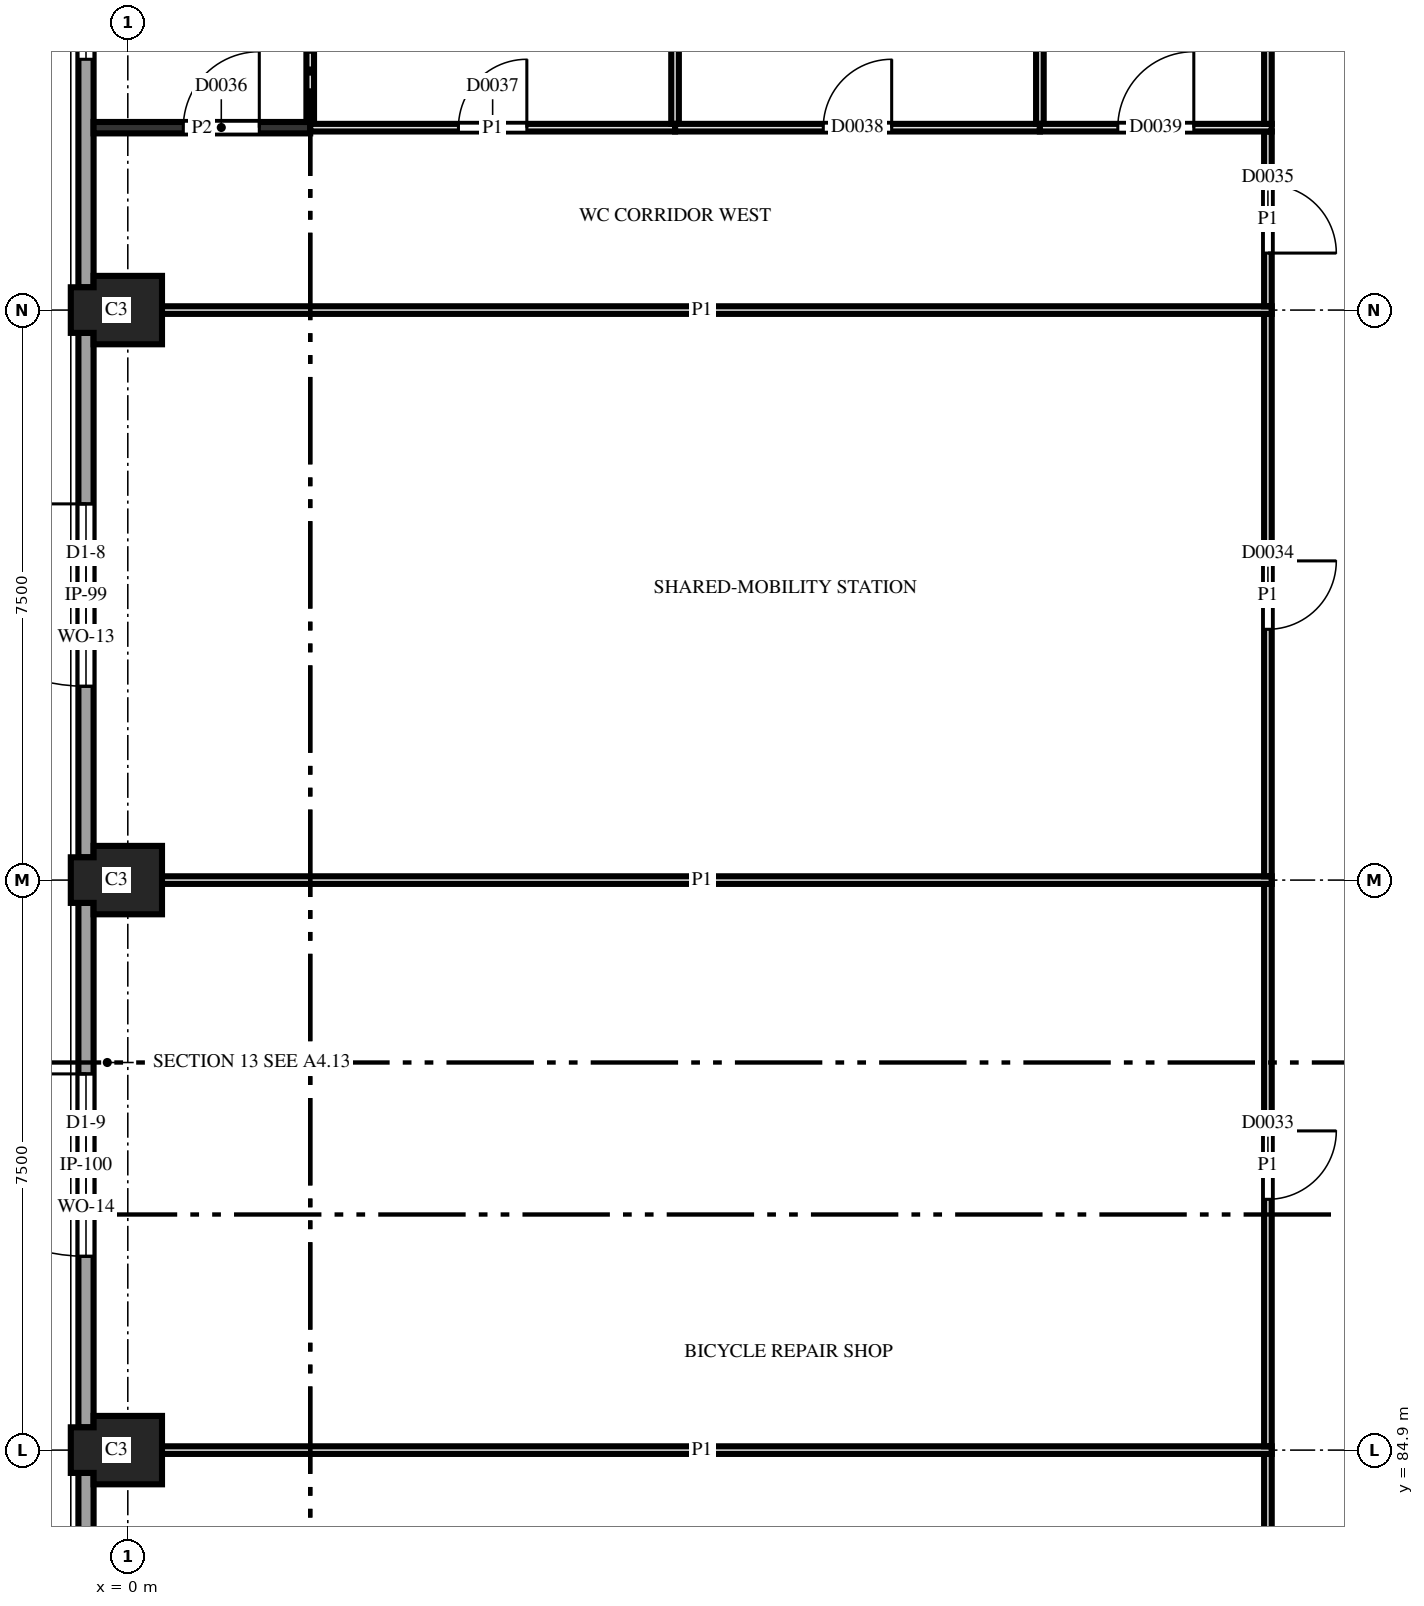
"""IFC4 building model, lengths in metres.
Left out: names, types, materials, properties, quantities, classifications, styles, units other than length and angle.
Written with IfcOpenShell. Run it as: python <this file> out.ifc"""

import sys

from ifc_helpers import new_model, si_unit, direction, frame, frame_2d, origin, place, context, subcontext, project, spatial, polyline, rectangle, outline, extrude, element, fill, save


model = new_model("IFC4")
c1 = context("Model", 3, precision=1e-05, world=origin(), true_north=direction((0.0, 1.0)))
c2 = subcontext(c1, "Body", "Model", "MODEL_VIEW")
j1 = project(units=[si_unit("LENGTHUNIT", "METRE"), si_unit("PLANEANGLEUNIT", "RADIAN")], contexts=[c1])
p1 = place(None, origin())
s1 = spatial("IfcSite", under=j1, at=p1, CompositionType="ELEMENT")
p2 = place(p1, origin())
s2 = spatial("IfcBuilding", under=s1, at=p2, CompositionType="ELEMENT")
p3 = place(p2, origin())
s3 = spatial("IfcBuildingStorey", under=s2, at=p3, CompositionType="ELEMENT", Elevation=0.0)
for number, where, z_axis, x_axis in (
    (1, (0.0, 84.9, 0.0), (0.0, 0.0, 1.0), (-1.0, 0.0, 0.0)),
    (2, (0.0, 92.4, 0.0), (0.0, 0.0, 1.0), (-1.0, 0.0, 0.0)),
    (3, (0.0, 99.9, 0.0), (0.0, 0.0, 1.0), (-1.0, 0.0, 0.0)),
):
    element("IfcColumn", number, at=place(p3, frame(where, z_axis=z_axis, x_axis=x_axis)), inside=s3, PredefinedType="COLUMN", context=c2, shape_type="SweptSolid", body=[
        extrude(outline(polyline([(-0.45, -0.45), (0.45, -0.45), (0.45, -0.3), (0.75, -0.3), (0.75, 0.3), (0.45, 0.3), (0.45, 0.45), (-0.45, 0.45), (-0.45, -0.45)])), origin(), (0.0, 0.0, 1.0), 4.5),
    ])
p4 = place(p3, frame((-0.55, 107.1, 0.0), z_axis=(0.0, 0.0, 1.0), x_axis=(0.0, -1.0, 0.0)))
e4 = element("IfcWall", 4, at=p4, inside=s3, PredefinedType="SOLIDWALL", context=c2, shape_type="SweptSolid", body=[
    extrude(outline(polyline([(0.0, 0.0), (6.9, 0.0), (6.9, 3.1), (6.002, 3.1), (6.0, 2.4), (5.681, 2.56), (5.363, 2.695), (5.044, 2.806), (4.725, 2.895), (4.406, 2.963), (4.087, 3.012), (3.769, 3.041), (3.45, 3.05), (3.131, 3.041), (2.812, 3.012), (2.494, 2.963), (2.175, 2.895), (1.856, 2.806), (1.538, 2.695), (1.219, 2.56), (0.9, 2.4), (0.898, 3.1), (0.0, 3.1), (0.0, 0.0)])), frame((0.0, 0.1, 0.0), z_axis=(0.0, -1.0, 0.0), x_axis=(1.0, 0.0, 0.0)), (0.0, 0.0, 1.0), 0.2),
])
p5 = place(p4, frame((3.0, 0.0, 2.4)))
e5 = element("IfcOpeningElement", 5, at=p5, cuts=e4, PredefinedType="OPENING", context=c2, shape_type="SweptSolid", body=[
    extrude(rectangle(XDim=0.9, YDim=0.531, at=frame_2d((0.45, 0.266))), frame((0.0, 0.11, 0.0), z_axis=(0.0, -1.0, 0.0), x_axis=(1.0, 0.0, 0.0)), (0.0, 0.0, 1.0), 0.22),
])
p6 = place(p3, frame((-0.55, 99.6, 0.0), z_axis=(0.0, 0.0, 1.0), x_axis=(0.0, -1.0, 0.0)))
e6 = element("IfcWall", 6, at=p6, inside=s3, PredefinedType="SOLIDWALL", context=c2, shape_type="SweptSolid", body=[
    extrude(outline(polyline([(0.0, 0.0), (6.9, 0.0), (6.9, 3.1), (6.002, 3.1), (6.0, 2.4), (5.681, 2.56), (5.363, 2.695), (5.044, 2.806), (4.725, 2.895), (4.406, 2.963), (4.087, 3.012), (3.769, 3.041), (3.45, 3.05), (3.131, 3.041), (2.812, 3.012), (2.494, 2.963), (2.175, 2.895), (1.856, 2.806), (1.538, 2.695), (1.219, 2.56), (0.9, 2.4), (0.898, 3.1), (0.0, 3.1), (0.0, 0.0)])), frame((0.0, 0.1, 0.0), z_axis=(0.0, -1.0, 0.0), x_axis=(1.0, 0.0, 0.0)), (0.0, 0.0, 1.0), 0.2),
])
p7 = place(p6, frame((2.25, 0.0, 0.0)))
e7 = element("IfcOpeningElement", 7, at=p7, cuts=e6, PredefinedType="OPENING", context=c2, shape_type="SweptSolid", body=[
    extrude(rectangle(XDim=2.4, YDim=2.1, at=frame_2d((1.2, 1.05))), frame((0.0, 0.11, 0.0), z_axis=(0.0, -1.0, 0.0), x_axis=(1.0, 0.0, 0.0)), (0.0, 0.0, 1.0), 0.22),
])
p8 = place(p6, frame((2.25, 0.0, 2.25)))
e8 = element("IfcOpeningElement", 8, at=p8, cuts=e6, PredefinedType="OPENING", context=c2, shape_type="SweptSolid", body=[
    extrude(rectangle(XDim=2.4, YDim=0.563, at=frame_2d((1.2, 0.281))), frame((0.0, 0.11, 0.0), z_axis=(0.0, -1.0, 0.0), x_axis=(1.0, 0.0, 0.0)), (0.0, 0.0, 1.0), 0.22),
])
p9 = place(p3, frame((-0.55, 92.1, 0.0), z_axis=(0.0, 0.0, 1.0), x_axis=(0.0, -1.0, 0.0)))
e9 = element("IfcWall", 9, at=p9, inside=s3, PredefinedType="SOLIDWALL", context=c2, shape_type="SweptSolid", body=[
    extrude(outline(polyline([(0.0, 0.0), (6.9, 0.0), (6.9, 3.1), (6.002, 3.1), (6.0, 2.4), (5.681, 2.56), (5.363, 2.695), (5.044, 2.806), (4.725, 2.895), (4.406, 2.963), (4.087, 3.012), (3.769, 3.041), (3.45, 3.05), (3.131, 3.041), (2.812, 3.012), (2.494, 2.963), (2.175, 2.895), (1.856, 2.806), (1.538, 2.695), (1.219, 2.56), (0.9, 2.4), (0.898, 3.1), (0.0, 3.1), (0.0, 0.0)])), frame((0.0, 0.1, 0.0), z_axis=(0.0, -1.0, 0.0), x_axis=(1.0, 0.0, 0.0)), (0.0, 0.0, 1.0), 0.2),
])
p10 = place(p9, frame((2.25, 0.0, 0.0)))
e10 = element("IfcOpeningElement", 10, at=p10, cuts=e9, PredefinedType="OPENING", context=c2, shape_type="SweptSolid", body=[
    extrude(rectangle(XDim=2.4, YDim=2.1, at=frame_2d((1.2, 1.05))), frame((0.0, 0.11, 0.0), z_axis=(0.0, -1.0, 0.0), x_axis=(1.0, 0.0, 0.0)), (0.0, 0.0, 1.0), 0.22),
])
p11 = place(p9, frame((2.25, 0.0, 2.25)))
e11 = element("IfcOpeningElement", 11, at=p11, cuts=e9, PredefinedType="OPENING", context=c2, shape_type="SweptSolid", body=[
    extrude(rectangle(XDim=2.4, YDim=0.563, at=frame_2d((1.2, 0.281))), frame((0.0, 0.11, 0.0), z_axis=(0.0, -1.0, 0.0), x_axis=(1.0, 0.0, 0.0)), (0.0, 0.0, 1.0), 0.22),
])
p12 = place(p3, frame((-0.55, 84.6, 0.0), z_axis=(0.0, 0.0, 1.0), x_axis=(0.0, -1.0, 0.0)))
e12 = element("IfcWall", 12, at=p12, inside=s3, PredefinedType="SOLIDWALL", context=c2, shape_type="SweptSolid", body=[
    extrude(outline(polyline([(0.0, 0.0), (6.9, 0.0), (6.9, 3.1), (6.002, 3.1), (6.0, 2.4), (5.681, 2.56), (5.363, 2.695), (5.044, 2.806), (4.725, 2.895), (4.406, 2.963), (4.087, 3.012), (3.769, 3.041), (3.45, 3.05), (3.131, 3.041), (2.812, 3.012), (2.494, 2.963), (2.175, 2.895), (1.856, 2.806), (1.538, 2.695), (1.219, 2.56), (0.9, 2.4), (0.898, 3.1), (0.0, 3.1), (0.0, 0.0)])), frame((0.0, 0.1, 0.0), z_axis=(0.0, -1.0, 0.0), x_axis=(1.0, 0.0, 0.0)), (0.0, 0.0, 1.0), 0.2),
])
p13 = place(p12, frame((3.0, 0.0, 2.4)))
e13 = element("IfcOpeningElement", 13, at=p13, cuts=e12, PredefinedType="OPENING", context=c2, shape_type="SweptSolid", body=[
    extrude(rectangle(XDim=0.9, YDim=0.531, at=frame_2d((0.45, 0.266))), frame((0.0, 0.11, 0.0), z_axis=(0.0, -1.0, 0.0), x_axis=(1.0, 0.0, 0.0)), (0.0, 0.0, 1.0), 0.22),
])
p14 = place(p3, frame((15.0, 62.5, 0.0), z_axis=(0.0, 0.0, 1.0), x_axis=(0.0, 1.0, 0.0)))
e14 = element("IfcWall", 14, at=p14, inside=s3, PredefinedType="PARTITIONING", context=c2, shape_type="SweptSolid", body=[
    extrude(rectangle(XDim=22.35, YDim=0.1, at=frame_2d((11.175, 0.0))), origin(), (0.0, 0.0, 1.0), 3.68),
])
p15 = place(p14, frame((10.725, 0.0, 0.0)))
e15 = element("IfcOpeningElement", 15, at=p15, cuts=e14, PredefinedType="OPENING", context=c2, shape_type="SweptSolid", body=[
    extrude(rectangle(XDim=0.9, YDim=2.1, at=frame_2d((0.45, 1.05))), frame((0.0, 0.06, 0.0), z_axis=(0.0, -1.0, 0.0), x_axis=(1.0, 0.0, 0.0)), (0.0, 0.0, 1.0), 0.12),
])
p16 = place(p3, frame((15.05, 84.9, 0.0), z_axis=(0.0, 0.0, 1.0), x_axis=(-1.0, 0.0, 0.0)))
e16 = element("IfcWall", 16, at=p16, inside=s3, PredefinedType="PARTITIONING", context=c2, shape_type="SweptSolid", body=[
    extrude(rectangle(XDim=14.99, YDim=0.1, at=frame_2d((7.495, 0.0))), origin(), (0.0, 0.0, 1.0), 3.68),
])
p17 = place(p3, frame((15.0, 84.95, 0.0), z_axis=(0.0, 0.0, 1.0), x_axis=(0.0, 1.0, 0.0)))
e17 = element("IfcWall", 17, at=p17, inside=s3, PredefinedType="PARTITIONING", context=c2, shape_type="SweptSolid", body=[
    extrude(rectangle(XDim=7.4, YDim=0.1, at=frame_2d((3.7, 0.0))), origin(), (0.0, 0.0, 1.0), 3.68),
])
p18 = place(p17, frame((3.25, 0.0, 0.0)))
e18 = element("IfcOpeningElement", 18, at=p18, cuts=e17, PredefinedType="OPENING", context=c2, shape_type="SweptSolid", body=[
    extrude(rectangle(XDim=0.9, YDim=2.1, at=frame_2d((0.45, 1.05))), frame((0.0, 0.06, 0.0), z_axis=(0.0, -1.0, 0.0), x_axis=(1.0, 0.0, 0.0)), (0.0, 0.0, 1.0), 0.12),
])
p19 = place(p3, frame((15.05, 92.4, 0.0), z_axis=(0.0, 0.0, 1.0), x_axis=(-1.0, 0.0, 0.0)))
e19 = element("IfcWall", 19, at=p19, inside=s3, PredefinedType="PARTITIONING", context=c2, shape_type="SweptSolid", body=[
    extrude(rectangle(XDim=14.99, YDim=0.1, at=frame_2d((7.495, 0.0))), origin(), (0.0, 0.0, 1.0), 3.68),
])
p20 = place(p3, frame((15.0, 92.45, 0.0), z_axis=(0.0, 0.0, 1.0), x_axis=(0.0, 1.0, 0.0)))
e20 = element("IfcWall", 20, at=p20, inside=s3, PredefinedType="PARTITIONING", context=c2, shape_type="SweptSolid", body=[
    extrude(rectangle(XDim=7.4, YDim=0.1, at=frame_2d((3.7, 0.0))), origin(), (0.0, 0.0, 1.0), 3.68),
])
p21 = place(p20, frame((3.25, 0.0, 0.0)))
e21 = element("IfcOpeningElement", 21, at=p21, cuts=e20, PredefinedType="OPENING", context=c2, shape_type="SweptSolid", body=[
    extrude(rectangle(XDim=0.9, YDim=2.1, at=frame_2d((0.45, 1.05))), frame((0.0, 0.06, 0.0), z_axis=(0.0, -1.0, 0.0), x_axis=(1.0, 0.0, 0.0)), (0.0, 0.0, 1.0), 0.12),
])
p22 = place(p3, frame((15.05, 99.9, 0.0), z_axis=(0.0, 0.0, 1.0), x_axis=(-1.0, 0.0, 0.0)))
e22 = element("IfcWall", 22, at=p22, inside=s3, PredefinedType="PARTITIONING", context=c2, shape_type="SweptSolid", body=[
    extrude(rectangle(XDim=14.99, YDim=0.1, at=frame_2d((7.495, 0.0))), origin(), (0.0, 0.0, 1.0), 3.68),
])
p23 = place(p3, frame((15.0, 99.95, 0.0), z_axis=(0.0, 0.0, 1.0), x_axis=(0.0, 1.0, 0.0)))
e23 = element("IfcWall", 23, at=p23, inside=s3, PredefinedType="PARTITIONING", context=c2, shape_type="SweptSolid", body=[
    extrude(rectangle(XDim=2.3, YDim=0.1, at=frame_2d((1.15, 0.0))), origin(), (0.0, 0.0, 1.0), 3.68),
])
p24 = place(p23, frame((0.7, 0.0, 0.0)))
e24 = element("IfcOpeningElement", 24, at=p24, cuts=e23, PredefinedType="OPENING", context=c2, shape_type="SweptSolid", body=[
    extrude(rectangle(XDim=0.9, YDim=2.1, at=frame_2d((0.45, 1.05))), frame((0.0, 0.06, 0.0), z_axis=(0.0, -1.0, 0.0), x_axis=(1.0, 0.0, 0.0)), (0.0, 0.0, 1.0), 0.12),
])
p25 = place(p3, frame((2.4, 102.3, 0.0), z_axis=(0.0, 0.0, 1.0), x_axis=(-1.0, 0.0, 0.0)))
e25 = element("IfcWall", 25, at=p25, inside=s3, PredefinedType="PARTITIONING", context=c2, shape_type="SweptSolid", body=[
    extrude(rectangle(XDim=2.85, YDim=0.15, at=frame_2d((1.425, 0.0))), origin(), (0.0, 0.0, 1.0), 3.68),
])
p26 = place(p25, frame((0.67, 0.0, 0.0)))
e26 = element("IfcOpeningElement", 26, at=p26, cuts=e25, PredefinedType="OPENING", context=c2, shape_type="SweptSolid", body=[
    extrude(rectangle(XDim=1.0, YDim=2.1, at=frame_2d((0.5, 1.05))), frame((0.0, 0.085, 0.0), z_axis=(0.0, -1.0, 0.0), x_axis=(1.0, 0.0, 0.0)), (0.0, 0.0, 1.0), 0.17),
])
p27 = place(p3, frame((2.4, 102.375, 0.0), z_axis=(0.0, 0.0, 1.0), x_axis=(0.0, 1.0, 0.0)))
e27 = element("IfcWall", 27, at=p27, inside=s3, PredefinedType="PARTITIONING", context=c2, shape_type="SweptSolid", body=[
    extrude(rectangle(XDim=4.975, YDim=0.1, at=frame_2d((2.488, 0.0))), origin(), (0.0, 0.0, 1.0), 3.68),
])
p28 = place(p3, frame((7.2, 102.3, 0.0), z_axis=(0.0, 0.0, 1.0), x_axis=(-1.0, 0.0, 0.0)))
e28 = element("IfcWall", 28, at=p28, inside=s3, PredefinedType="PARTITIONING", context=c2, shape_type="SweptSolid", body=[
    extrude(rectangle(XDim=4.8, YDim=0.1, at=frame_2d((2.4, 0.0))), origin(), (0.0, 0.0, 1.0), 3.68),
])
p29 = place(p28, frame((1.95, 0.0, 0.0)))
e29 = element("IfcOpeningElement", 29, at=p29, cuts=e28, PredefinedType="OPENING", context=c2, shape_type="SweptSolid", body=[
    extrude(rectangle(XDim=0.9, YDim=2.1, at=frame_2d((0.45, 1.05))), frame((0.0, 0.06, 0.0), z_axis=(0.0, -1.0, 0.0), x_axis=(1.0, 0.0, 0.0)), (0.0, 0.0, 1.0), 0.12),
])
p30 = place(p3, frame((7.2, 102.35, 0.0), z_axis=(0.0, 0.0, 1.0), x_axis=(0.0, 1.0, 0.0)))
e30 = element("IfcWall", 30, at=p30, inside=s3, PredefinedType="PARTITIONING", context=c2, shape_type="SweptSolid", body=[
    extrude(rectangle(XDim=4.95, YDim=0.1, at=frame_2d((2.475, 0.0))), origin(), (0.0, 0.0, 1.0), 3.68),
])
p31 = place(p3, frame((12.0, 102.3, 0.0), z_axis=(0.0, 0.0, 1.0), x_axis=(-1.0, 0.0, 0.0)))
e31 = element("IfcWall", 31, at=p31, inside=s3, PredefinedType="PARTITIONING", context=c2, shape_type="SweptSolid", body=[
    extrude(rectangle(XDim=4.8, YDim=0.1, at=frame_2d((2.4, 0.0))), origin(), (0.0, 0.0, 1.0), 3.68),
])
p32 = place(p31, frame((1.95, 0.0, 0.0)))
e32 = element("IfcOpeningElement", 32, at=p32, cuts=e31, PredefinedType="OPENING", context=c2, shape_type="SweptSolid", body=[
    extrude(rectangle(XDim=0.9, YDim=2.1, at=frame_2d((0.45, 1.05))), frame((0.0, 0.06, 0.0), z_axis=(0.0, -1.0, 0.0), x_axis=(1.0, 0.0, 0.0)), (0.0, 0.0, 1.0), 0.12),
])
p33 = place(p3, frame((12.0, 102.35, 0.0), z_axis=(0.0, 0.0, 1.0), x_axis=(0.0, 1.0, 0.0)))
e33 = element("IfcWall", 33, at=p33, inside=s3, PredefinedType="PARTITIONING", context=c2, shape_type="SweptSolid", body=[
    extrude(rectangle(XDim=5.0, YDim=0.1, at=frame_2d((2.5, 0.0))), origin(), (0.0, 0.0, 1.0), 3.68),
])
p34 = place(p3, frame((15.05, 102.3, 0.0), z_axis=(0.0, 0.0, 1.0), x_axis=(-1.0, 0.0, 0.0)))
e34 = element("IfcWall", 34, at=p34, inside=s3, PredefinedType="PARTITIONING", context=c2, shape_type="SweptSolid", body=[
    extrude(rectangle(XDim=3.05, YDim=0.1, at=frame_2d((1.525, 0.0))), origin(), (0.0, 0.0, 1.0), 3.68),
])
p35 = place(p34, frame((1.025, 0.0, 0.0)))
e35 = element("IfcOpeningElement", 35, at=p35, cuts=e34, PredefinedType="OPENING", context=c2, shape_type="SweptSolid", body=[
    extrude(rectangle(XDim=1.0, YDim=2.1, at=frame_2d((0.5, 1.05))), frame((0.0, 0.06, 0.0), z_axis=(0.0, -1.0, 0.0), x_axis=(1.0, 0.0, 0.0)), (0.0, 0.0, 1.0), 0.12),
])
p36 = place(p3, frame((15.0, 102.35, 0.0), z_axis=(0.0, 0.0, 1.0), x_axis=(0.0, 1.0, 0.0)))
e36 = element("IfcWall", 36, at=p36, inside=s3, PredefinedType="PARTITIONING", context=c2, shape_type="SweptSolid", body=[
    extrude(rectangle(XDim=5.0, YDim=0.1, at=frame_2d((2.5, 0.0))), origin(), (0.0, 0.0, 1.0), 3.68),
])
p37 = place(p5, origin())
e37 = element("IfcWindow", 37, at=p37, inside=s3, PartitioningType="SINGLE_PANEL", PredefinedType="WINDOW", context=c2, shape_type="SweptSolid", body=[
    extrude(rectangle(XDim=0.9, YDim=0.531, at=frame_2d((0.45, 0.266))), frame((0.0, 0.03, 0.0), z_axis=(0.0, -1.0, 0.0), x_axis=(1.0, 0.0, 0.0)), (0.0, 0.0, 1.0), 0.06),
])
fill(e5, e37)
p38 = place(p7, frame((2.4, 0.0, 0.0), z_axis=(0.0, 0.0, 1.0), x_axis=(-1.0, 0.0, 0.0)))
e38 = element("IfcDoor", 38, at=p38, inside=s3, OperationType="SINGLE_SWING_LEFT", PredefinedType="DOOR", context=c2, shape_type="SweptSolid", body=[
    extrude(rectangle(XDim=2.4, YDim=2.1, at=frame_2d((1.2, 1.05))), frame((0.0, 0.025, 0.0), z_axis=(0.0, -1.0, 0.0), x_axis=(1.0, 0.0, 0.0)), (0.0, 0.0, 1.0), 0.05),
])
fill(e7, e38)
p39 = place(p8, origin())
e39 = element("IfcWindow", 39, at=p39, inside=s3, PartitioningType="SINGLE_PANEL", PredefinedType="WINDOW", context=c2, shape_type="SweptSolid", body=[
    extrude(rectangle(XDim=2.4, YDim=0.563, at=frame_2d((1.2, 0.281))), frame((0.0, 0.03, 0.0), z_axis=(0.0, -1.0, 0.0), x_axis=(1.0, 0.0, 0.0)), (0.0, 0.0, 1.0), 0.06),
])
fill(e8, e39)
p40 = place(p10, frame((2.4, 0.0, 0.0), z_axis=(0.0, 0.0, 1.0), x_axis=(-1.0, 0.0, 0.0)))
e40 = element("IfcDoor", 40, at=p40, inside=s3, OperationType="SINGLE_SWING_LEFT", PredefinedType="DOOR", context=c2, shape_type="SweptSolid", body=[
    extrude(rectangle(XDim=2.4, YDim=2.1, at=frame_2d((1.2, 1.05))), frame((0.0, 0.025, 0.0), z_axis=(0.0, -1.0, 0.0), x_axis=(1.0, 0.0, 0.0)), (0.0, 0.0, 1.0), 0.05),
])
fill(e10, e40)
p41 = place(p11, origin())
e41 = element("IfcWindow", 41, at=p41, inside=s3, PartitioningType="SINGLE_PANEL", PredefinedType="WINDOW", context=c2, shape_type="SweptSolid", body=[
    extrude(rectangle(XDim=2.4, YDim=0.563, at=frame_2d((1.2, 0.281))), frame((0.0, 0.03, 0.0), z_axis=(0.0, -1.0, 0.0), x_axis=(1.0, 0.0, 0.0)), (0.0, 0.0, 1.0), 0.06),
])
fill(e11, e41)
p42 = place(p18, origin())
e42 = element("IfcDoor", 42, at=p42, inside=s3, OperationType="SINGLE_SWING_RIGHT", PredefinedType="DOOR", context=c2, shape_type="SweptSolid", body=[
    extrude(rectangle(XDim=0.9, YDim=2.1, at=frame_2d((0.45, 1.05))), frame((0.0, 0.025, 0.0), z_axis=(0.0, -1.0, 0.0), x_axis=(1.0, 0.0, 0.0)), (0.0, 0.0, 1.0), 0.05),
])
fill(e18, e42)
p43 = place(p21, origin())
e43 = element("IfcDoor", 43, at=p43, inside=s3, OperationType="SINGLE_SWING_RIGHT", PredefinedType="DOOR", context=c2, shape_type="SweptSolid", body=[
    extrude(rectangle(XDim=0.9, YDim=2.1, at=frame_2d((0.45, 1.05))), frame((0.0, 0.025, 0.0), z_axis=(0.0, -1.0, 0.0), x_axis=(1.0, 0.0, 0.0)), (0.0, 0.0, 1.0), 0.05),
])
fill(e21, e43)
p44 = place(p24, origin())
e44 = element("IfcDoor", 44, at=p44, inside=s3, OperationType="SINGLE_SWING_LEFT", PredefinedType="DOOR", context=c2, shape_type="SweptSolid", body=[
    extrude(rectangle(XDim=0.9, YDim=2.1, at=frame_2d((0.45, 1.05))), frame((0.0, 0.025, 0.0), z_axis=(0.0, -1.0, 0.0), x_axis=(1.0, 0.0, 0.0)), (0.0, 0.0, 1.0), 0.05),
])
fill(e24, e44)
p45 = place(p26, origin())
e45 = element("IfcDoor", 45, at=p45, inside=s3, OperationType="SINGLE_SWING_LEFT", PredefinedType="DOOR", context=c2, shape_type="SweptSolid", body=[
    extrude(rectangle(XDim=1.0, YDim=2.1, at=frame_2d((0.5, 1.05))), frame((0.0, 0.025, 0.0), z_axis=(0.0, -1.0, 0.0), x_axis=(1.0, 0.0, 0.0)), (0.0, 0.0, 1.0), 0.05),
])
fill(e26, e45)
p46 = place(p29, origin())
e46 = element("IfcDoor", 46, at=p46, inside=s3, OperationType="SINGLE_SWING_LEFT", PredefinedType="DOOR", context=c2, shape_type="SweptSolid", body=[
    extrude(rectangle(XDim=0.9, YDim=2.1, at=frame_2d((0.45, 1.05))), frame((0.0, 0.025, 0.0), z_axis=(0.0, -1.0, 0.0), x_axis=(1.0, 0.0, 0.0)), (0.0, 0.0, 1.0), 0.05),
])
fill(e29, e46)
p47 = place(p32, origin())
e47 = element("IfcDoor", 47, at=p47, inside=s3, OperationType="SINGLE_SWING_LEFT", PredefinedType="DOOR", context=c2, shape_type="SweptSolid", body=[
    extrude(rectangle(XDim=0.9, YDim=2.1, at=frame_2d((0.45, 1.05))), frame((0.0, 0.025, 0.0), z_axis=(0.0, -1.0, 0.0), x_axis=(1.0, 0.0, 0.0)), (0.0, 0.0, 1.0), 0.05),
])
fill(e32, e47)
p48 = place(p35, origin())
e48 = element("IfcDoor", 48, at=p48, inside=s3, OperationType="SINGLE_SWING_LEFT", PredefinedType="DOOR", context=c2, shape_type="SweptSolid", body=[
    extrude(rectangle(XDim=1.0, YDim=2.1, at=frame_2d((0.5, 1.05))), frame((0.0, 0.025, 0.0), z_axis=(0.0, -1.0, 0.0), x_axis=(1.0, 0.0, 0.0)), (0.0, 0.0, 1.0), 0.05),
])
fill(e35, e48)
save(model, sys.argv[1])
